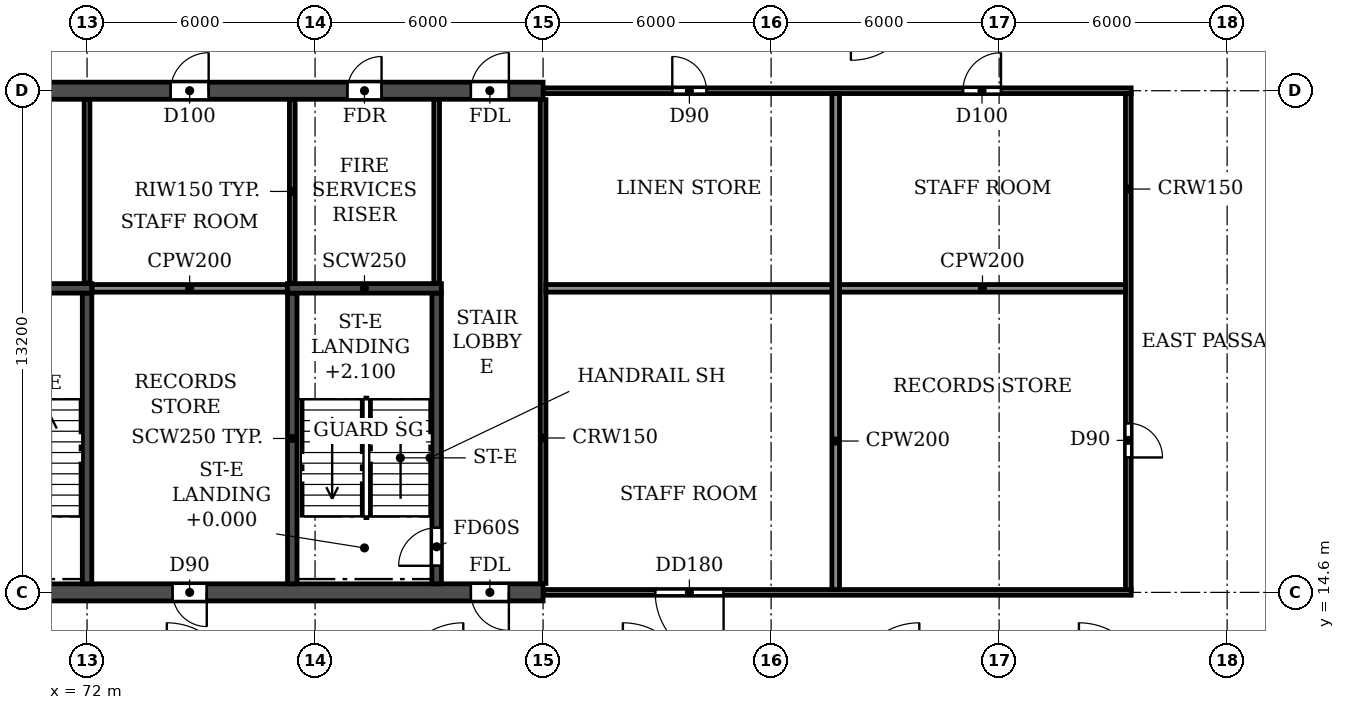
"""IFC4 building model, lengths in metres.
Left out: names, types, materials, properties, quantities, classifications, styles, units other than length and angle.
Written with IfcOpenShell. Run it as: python <this file> out.ifc"""

import sys

from ifc_helpers import new_model, si_unit, direction, frame, frame_2d, origin, place, context, subcontext, project, spatial, rectangle, extrude, element, fill, save


model = new_model("IFC4")
c1 = context("Model", 3, precision=1e-05, world=origin(), true_north=direction((0.0, 1.0)))
c2 = subcontext(c1, "Body", "Model", "MODEL_VIEW")
j1 = project(units=[si_unit("LENGTHUNIT", "METRE"), si_unit("PLANEANGLEUNIT", "RADIAN")], contexts=[c1])
p1 = place(None, origin())
s1 = spatial("IfcSite", under=j1, at=p1, CompositionType="ELEMENT")
p2 = place(p1, origin())
s2 = spatial("IfcBuilding", under=s1, at=p2, CompositionType="ELEMENT")
p3 = place(p2, frame((0.0, 0.0, 10.8)))
s3 = spatial("IfcBuildingStorey", under=s2, at=p3, CompositionType="ELEMENT", Elevation=10.8)
p4 = place(p3, frame((18.0, 14.6, 0.0), z_axis=(0.0, 0.0, 1.0), x_axis=(1.0, 0.0, 0.0)))
e1 = element("IfcWall", 1, at=p4, inside=s3, PredefinedType="SOLIDWALL", context=c2, shape_type="SweptSolid", body=[
    extrude(rectangle(XDim=66.0, YDim=0.45, at=frame_2d((33.0, 0.0))), origin(), (0.0, 0.0, 1.0), 3.92),
])
p5 = place(p4, frame((0.9, 0.0, 0.0)))
e2 = element("IfcOpeningElement", 2, at=p5, cuts=e1, PredefinedType="OPENING", context=c2, shape_type="SweptSolid", body=[
    extrude(rectangle(XDim=1.0, YDim=2.1, at=frame_2d((0.5, 1.05))), frame((0.0, 0.235, 0.0), z_axis=(0.0, -1.0, 0.0), x_axis=(1.0, 0.0, 0.0)), (0.0, 0.0, 1.0), 0.47),
])
p6 = place(p4, frame((8.8, 0.0, 0.0)))
e3 = element("IfcOpeningElement", 3, at=p6, cuts=e1, PredefinedType="OPENING", context=c2, shape_type="SweptSolid", body=[
    extrude(rectangle(XDim=1.0, YDim=2.1, at=frame_2d((0.5, 1.05))), frame((0.0, 0.235, 0.0), z_axis=(0.0, -1.0, 0.0), x_axis=(1.0, 0.0, 0.0)), (0.0, 0.0, 1.0), 0.47),
])
p7 = place(p4, frame((13.4, 0.0, 0.0)))
e4 = element("IfcOpeningElement", 4, at=p7, cuts=e1, PredefinedType="OPENING", context=c2, shape_type="SweptSolid", body=[
    extrude(rectangle(XDim=1.0, YDim=2.1, at=frame_2d((0.5, 1.05))), frame((0.0, 0.235, 0.0), z_axis=(0.0, -1.0, 0.0), x_axis=(1.0, 0.0, 0.0)), (0.0, 0.0, 1.0), 0.47),
])
p8 = place(p4, frame((24.7, 0.0, 0.0)))
e5 = element("IfcOpeningElement", 5, at=p8, cuts=e1, PredefinedType="OPENING", context=c2, shape_type="SweptSolid", body=[
    extrude(rectangle(XDim=1.0, YDim=2.1, at=frame_2d((0.5, 1.05))), frame((0.0, 0.235, 0.0), z_axis=(0.0, -1.0, 0.0), x_axis=(1.0, 0.0, 0.0)), (0.0, 0.0, 1.0), 0.47),
])
p9 = place(p4, frame((28.6, 0.0, 0.0)))
e6 = element("IfcOpeningElement", 6, at=p9, cuts=e1, PredefinedType="OPENING", context=c2, shape_type="SweptSolid", body=[
    extrude(rectangle(XDim=1.0, YDim=2.1, at=frame_2d((0.5, 1.05))), frame((0.0, 0.235, 0.0), z_axis=(0.0, -1.0, 0.0), x_axis=(1.0, 0.0, 0.0)), (0.0, 0.0, 1.0), 0.47),
])
p10 = place(p4, frame((32.5, 0.0, 0.0)))
e7 = element("IfcOpeningElement", 7, at=p10, cuts=e1, PredefinedType="OPENING", context=c2, shape_type="SweptSolid", body=[
    extrude(rectangle(XDim=1.0, YDim=2.1, at=frame_2d((0.5, 1.05))), frame((0.0, 0.235, 0.0), z_axis=(0.0, -1.0, 0.0), x_axis=(1.0, 0.0, 0.0)), (0.0, 0.0, 1.0), 0.47),
])
p11 = place(p4, frame((35.1, 0.0, 0.0)))
e8 = element("IfcOpeningElement", 8, at=p11, cuts=e1, PredefinedType="OPENING", context=c2, shape_type="SweptSolid", body=[
    extrude(rectangle(XDim=1.0, YDim=2.1, at=frame_2d((0.5, 1.05))), frame((0.0, 0.235, 0.0), z_axis=(0.0, -1.0, 0.0), x_axis=(1.0, 0.0, 0.0)), (0.0, 0.0, 1.0), 0.47),
])
p12 = place(p4, frame((39.0, 0.0, 0.0)))
e9 = element("IfcOpeningElement", 9, at=p12, cuts=e1, PredefinedType="OPENING", context=c2, shape_type="SweptSolid", body=[
    extrude(rectangle(XDim=1.0, YDim=2.1, at=frame_2d((0.5, 1.05))), frame((0.0, 0.235, 0.0), z_axis=(0.0, -1.0, 0.0), x_axis=(1.0, 0.0, 0.0)), (0.0, 0.0, 1.0), 0.47),
])
p13 = place(p4, frame((51.6, 0.0, 0.0)))
e10 = element("IfcOpeningElement", 10, at=p13, cuts=e1, PredefinedType="OPENING", context=c2, shape_type="SweptSolid", body=[
    extrude(rectangle(XDim=1.0, YDim=2.1, at=frame_2d((0.5, 1.05))), frame((0.0, 0.235, 0.0), z_axis=(0.0, -1.0, 0.0), x_axis=(1.0, 0.0, 0.0)), (0.0, 0.0, 1.0), 0.47),
])
p14 = place(p4, frame((56.25, 0.0, 0.0)))
e11 = element("IfcOpeningElement", 11, at=p14, cuts=e1, PredefinedType="OPENING", context=c2, shape_type="SweptSolid", body=[
    extrude(rectangle(XDim=0.9, YDim=2.1, at=frame_2d((0.45, 1.05))), frame((0.0, 0.235, 0.0), z_axis=(0.0, -1.0, 0.0), x_axis=(1.0, 0.0, 0.0)), (0.0, 0.0, 1.0), 0.47),
])
p15 = place(p4, frame((64.1, 0.0, 0.0)))
e12 = element("IfcOpeningElement", 12, at=p15, cuts=e1, PredefinedType="OPENING", context=c2, shape_type="SweptSolid", body=[
    extrude(rectangle(XDim=1.0, YDim=2.1, at=frame_2d((0.5, 1.05))), frame((0.0, 0.235, 0.0), z_axis=(0.0, -1.0, 0.0), x_axis=(1.0, 0.0, 0.0)), (0.0, 0.0, 1.0), 0.47),
])
p16 = place(p3, frame((18.0, 27.8, 0.0), z_axis=(0.0, 0.0, 1.0), x_axis=(1.0, 0.0, 0.0)))
e13 = element("IfcWall", 13, at=p16, inside=s3, PredefinedType="SOLIDWALL", context=c2, shape_type="SweptSolid", body=[
    extrude(rectangle(XDim=66.0, YDim=0.45, at=frame_2d((33.0, 0.0))), origin(), (0.0, 0.0, 1.0), 3.92),
])
p17 = place(p16, frame((0.9, 0.0, 0.0)))
e14 = element("IfcOpeningElement", 14, at=p17, cuts=e13, PredefinedType="OPENING", context=c2, shape_type="SweptSolid", body=[
    extrude(rectangle(XDim=1.0, YDim=2.1, at=frame_2d((0.5, 1.05))), frame((0.0, 0.235, 0.0), z_axis=(0.0, -1.0, 0.0), x_axis=(1.0, 0.0, 0.0)), (0.0, 0.0, 1.0), 0.47),
])
p18 = place(p16, frame((4.25, 0.0, 0.0)))
e15 = element("IfcOpeningElement", 15, at=p18, cuts=e13, PredefinedType="OPENING", context=c2, shape_type="SweptSolid", body=[
    extrude(rectangle(XDim=0.9, YDim=2.1, at=frame_2d((0.45, 1.05))), frame((0.0, 0.235, 0.0), z_axis=(0.0, -1.0, 0.0), x_axis=(1.0, 0.0, 0.0)), (0.0, 0.0, 1.0), 0.47),
])
p19 = place(p16, frame((8.85, 0.0, 0.0)))
e16 = element("IfcOpeningElement", 16, at=p19, cuts=e13, PredefinedType="OPENING", context=c2, shape_type="SweptSolid", body=[
    extrude(rectangle(XDim=0.9, YDim=2.1, at=frame_2d((0.45, 1.05))), frame((0.0, 0.235, 0.0), z_axis=(0.0, -1.0, 0.0), x_axis=(1.0, 0.0, 0.0)), (0.0, 0.0, 1.0), 0.47),
])
p20 = place(p16, frame((13.45, 0.0, 0.0)))
e17 = element("IfcOpeningElement", 17, at=p20, cuts=e13, PredefinedType="OPENING", context=c2, shape_type="SweptSolid", body=[
    extrude(rectangle(XDim=0.9, YDim=2.1, at=frame_2d((0.45, 1.05))), frame((0.0, 0.235, 0.0), z_axis=(0.0, -1.0, 0.0), x_axis=(1.0, 0.0, 0.0)), (0.0, 0.0, 1.0), 0.47),
])
p21 = place(p16, frame((18.95, 0.0, 0.0)))
e18 = element("IfcOpeningElement", 18, at=p21, cuts=e13, PredefinedType="OPENING", context=c2, shape_type="SweptSolid", body=[
    extrude(rectangle(XDim=1.5, YDim=2.1, at=frame_2d((0.75, 1.05))), frame((0.0, 0.235, 0.0), z_axis=(0.0, -1.0, 0.0), x_axis=(1.0, 0.0, 0.0)), (0.0, 0.0, 1.0), 0.47),
])
p22 = place(p16, frame((24.4, 0.0, 0.0)))
e19 = element("IfcOpeningElement", 19, at=p22, cuts=e13, PredefinedType="OPENING", context=c2, shape_type="SweptSolid", body=[
    extrude(rectangle(XDim=1.0, YDim=2.1, at=frame_2d((0.5, 1.05))), frame((0.0, 0.235, 0.0), z_axis=(0.0, -1.0, 0.0), x_axis=(1.0, 0.0, 0.0)), (0.0, 0.0, 1.0), 0.47),
])
p23 = place(p16, frame((29.6, 0.0, 0.0)))
e20 = element("IfcOpeningElement", 20, at=p23, cuts=e13, PredefinedType="OPENING", context=c2, shape_type="SweptSolid", body=[
    extrude(rectangle(XDim=1.0, YDim=2.1, at=frame_2d((0.5, 1.05))), frame((0.0, 0.235, 0.0), z_axis=(0.0, -1.0, 0.0), x_axis=(1.0, 0.0, 0.0)), (0.0, 0.0, 1.0), 0.47),
])
p24 = place(p16, frame((32.5, 0.0, 0.0)))
e21 = element("IfcOpeningElement", 21, at=p24, cuts=e13, PredefinedType="OPENING", context=c2, shape_type="SweptSolid", body=[
    extrude(rectangle(XDim=1.0, YDim=2.1, at=frame_2d((0.5, 1.05))), frame((0.0, 0.235, 0.0), z_axis=(0.0, -1.0, 0.0), x_axis=(1.0, 0.0, 0.0)), (0.0, 0.0, 1.0), 0.47),
])
p25 = place(p16, frame((38.0, 0.0, 0.0)))
e22 = element("IfcOpeningElement", 22, at=p25, cuts=e13, PredefinedType="OPENING", context=c2, shape_type="SweptSolid", body=[
    extrude(rectangle(XDim=1.0, YDim=2.1, at=frame_2d((0.5, 1.05))), frame((0.0, 0.235, 0.0), z_axis=(0.0, -1.0, 0.0), x_axis=(1.0, 0.0, 0.0)), (0.0, 0.0, 1.0), 0.47),
])
p26 = place(p16, frame((43.2, 0.0, 0.0)))
e23 = element("IfcOpeningElement", 23, at=p26, cuts=e13, PredefinedType="OPENING", context=c2, shape_type="SweptSolid", body=[
    extrude(rectangle(XDim=1.0, YDim=2.1, at=frame_2d((0.5, 1.05))), frame((0.0, 0.235, 0.0), z_axis=(0.0, -1.0, 0.0), x_axis=(1.0, 0.0, 0.0)), (0.0, 0.0, 1.0), 0.47),
])
p27 = place(p16, frame((47.1, 0.0, 0.0)))
e24 = element("IfcOpeningElement", 24, at=p27, cuts=e13, PredefinedType="OPENING", context=c2, shape_type="SweptSolid", body=[
    extrude(rectangle(XDim=1.0, YDim=2.1, at=frame_2d((0.5, 1.05))), frame((0.0, 0.235, 0.0), z_axis=(0.0, -1.0, 0.0), x_axis=(1.0, 0.0, 0.0)), (0.0, 0.0, 1.0), 0.47),
])
p28 = place(p16, frame((51.65, 0.0, 0.0)))
e25 = element("IfcOpeningElement", 25, at=p28, cuts=e13, PredefinedType="OPENING", context=c2, shape_type="SweptSolid", body=[
    extrude(rectangle(XDim=0.9, YDim=2.1, at=frame_2d((0.45, 1.05))), frame((0.0, 0.235, 0.0), z_axis=(0.0, -1.0, 0.0), x_axis=(1.0, 0.0, 0.0)), (0.0, 0.0, 1.0), 0.47),
])
p29 = place(p16, frame((56.2, 0.0, 0.0)))
e26 = element("IfcOpeningElement", 26, at=p29, cuts=e13, PredefinedType="OPENING", context=c2, shape_type="SweptSolid", body=[
    extrude(rectangle(XDim=1.0, YDim=2.1, at=frame_2d((0.5, 1.05))), frame((0.0, 0.235, 0.0), z_axis=(0.0, -1.0, 0.0), x_axis=(1.0, 0.0, 0.0)), (0.0, 0.0, 1.0), 0.47),
])
p30 = place(p16, frame((60.85, 0.0, 0.0)))
e27 = element("IfcOpeningElement", 27, at=p30, cuts=e13, PredefinedType="OPENING", context=c2, shape_type="SweptSolid", body=[
    extrude(rectangle(XDim=0.9, YDim=2.1, at=frame_2d((0.45, 1.05))), frame((0.0, 0.235, 0.0), z_axis=(0.0, -1.0, 0.0), x_axis=(1.0, 0.0, 0.0)), (0.0, 0.0, 1.0), 0.47),
])
p31 = place(p16, frame((64.1, 0.0, 0.0)))
e28 = element("IfcOpeningElement", 28, at=p31, cuts=e13, PredefinedType="OPENING", context=c2, shape_type="SweptSolid", body=[
    extrude(rectangle(XDim=1.0, YDim=2.1, at=frame_2d((0.5, 1.05))), frame((0.0, 0.235, 0.0), z_axis=(0.0, -1.0, 0.0), x_axis=(1.0, 0.0, 0.0)), (0.0, 0.0, 1.0), 0.47),
])
p32 = place(p3, frame((72.0, 14.825, 0.0), z_axis=(0.0, 0.0, 1.0), x_axis=(0.0, 1.0, 0.0)))
e29 = element("IfcWall", 29, at=p32, inside=s3, PredefinedType="SOLIDWALL", context=c2, shape_type="SweptSolid", body=[
    extrude(rectangle(XDim=7.65, YDim=0.25, at=frame_2d((3.825, 0.0))), origin(), (0.0, 0.0, 1.0), 3.92),
])
p33 = place(p3, frame((68.075, 22.6, 0.0), z_axis=(0.0, 0.0, 1.0), x_axis=(1.0, 0.0, 0.0)))
e30 = element("IfcWall", 30, at=p33, inside=s3, PredefinedType="SOLIDWALL", context=c2, shape_type="SweptSolid", body=[
    extrude(rectangle(XDim=4.05, YDim=0.25, at=frame_2d((2.025, 0.0))), origin(), (0.0, 0.0, 1.0), 3.92),
])
p34 = place(p3, frame((77.4, 14.825, 0.0), z_axis=(0.0, 0.0, 1.0), x_axis=(0.0, 1.0, 0.0)))
e31 = element("IfcWall", 31, at=p34, inside=s3, PredefinedType="SOLIDWALL", context=c2, shape_type="SweptSolid", body=[
    extrude(rectangle(XDim=7.65, YDim=0.25, at=frame_2d((3.825, 0.0))), origin(), (0.0, 0.0, 1.0), 3.92),
])
p35 = place(p3, frame((81.2, 14.825, 0.0), z_axis=(0.0, 0.0, 1.0), x_axis=(0.0, 1.0, 0.0)))
e32 = element("IfcWall", 32, at=p35, inside=s3, PredefinedType="SOLIDWALL", context=c2, shape_type="SweptSolid", body=[
    extrude(rectangle(XDim=7.65, YDim=0.25, at=frame_2d((3.825, 0.0))), origin(), (0.0, 0.0, 1.0), 3.92),
])
p36 = place(p35, frame((0.475, 0.0, 0.0)))
e33 = element("IfcOpeningElement", 33, at=p36, cuts=e32, PredefinedType="OPENING", context=c2, shape_type="SweptSolid", body=[
    extrude(rectangle(XDim=1.0, YDim=2.1, at=frame_2d((0.5, 1.05))), frame((0.0, 0.135, 0.0), z_axis=(0.0, -1.0, 0.0), x_axis=(1.0, 0.0, 0.0)), (0.0, 0.0, 1.0), 0.27),
])
p37 = place(p3, frame((77.275, 22.6, 0.0), z_axis=(0.0, 0.0, 1.0), x_axis=(1.0, 0.0, 0.0)))
e34 = element("IfcWall", 34, at=p37, inside=s3, PredefinedType="SOLIDWALL", context=c2, shape_type="SweptSolid", body=[
    extrude(rectangle(XDim=4.05, YDim=0.25, at=frame_2d((2.025, 0.0))), origin(), (0.0, 0.0, 1.0), 3.92),
])
p38 = place(p3, frame((84.01, 14.6, 0.0), z_axis=(0.0, 0.0, 1.0), x_axis=(1.0, 0.0, 0.0)))
e35 = element("IfcWall", 35, at=p38, inside=s3, PredefinedType="PARTITIONING", context=c2, shape_type="SweptSolid", body=[
    extrude(rectangle(XDim=15.465, YDim=0.15, at=frame_2d((7.732, 0.0))), origin(), (0.0, 0.0, 1.0), 3.92),
])
p39 = place(p38, frame((2.94, 0.0, 0.0)))
e36 = element("IfcOpeningElement", 36, at=p39, cuts=e35, PredefinedType="OPENING", context=c2, shape_type="SweptSolid", body=[
    extrude(rectangle(XDim=1.8, YDim=2.1, at=frame_2d((0.9, 1.05))), frame((0.0, 0.085, 0.0), z_axis=(0.0, -1.0, 0.0), x_axis=(1.0, 0.0, 0.0)), (0.0, 0.0, 1.0), 0.17),
])
p40 = place(p3, frame((84.01, 27.8, 0.0), z_axis=(0.0, 0.0, 1.0), x_axis=(1.0, 0.0, 0.0)))
e37 = element("IfcWall", 37, at=p40, inside=s3, PredefinedType="PARTITIONING", context=c2, shape_type="SweptSolid", body=[
    extrude(rectangle(XDim=15.465, YDim=0.15, at=frame_2d((7.732, 0.0))), origin(), (0.0, 0.0, 1.0), 3.92),
])
p41 = place(p40, frame((3.39, 0.0, 0.0)))
e38 = element("IfcOpeningElement", 38, at=p41, cuts=e37, PredefinedType="OPENING", context=c2, shape_type="SweptSolid", body=[
    extrude(rectangle(XDim=0.9, YDim=2.1, at=frame_2d((0.45, 1.05))), frame((0.0, 0.085, 0.0), z_axis=(0.0, -1.0, 0.0), x_axis=(1.0, 0.0, 0.0)), (0.0, 0.0, 1.0), 0.17),
])
p42 = place(p40, frame((11.04, 0.0, 0.0)))
e39 = element("IfcOpeningElement", 39, at=p42, cuts=e37, PredefinedType="OPENING", context=c2, shape_type="SweptSolid", body=[
    extrude(rectangle(XDim=1.0, YDim=2.1, at=frame_2d((0.5, 1.05))), frame((0.0, 0.085, 0.0), z_axis=(0.0, -1.0, 0.0), x_axis=(1.0, 0.0, 0.0)), (0.0, 0.0, 1.0), 0.17),
])
p43 = place(p3, frame((84.0, 14.835, 0.0), z_axis=(0.0, 0.0, 1.0), x_axis=(0.0, 1.0, 0.0)))
e40 = element("IfcWall", 40, at=p43, inside=s3, PredefinedType="PARTITIONING", context=c2, shape_type="SweptSolid", body=[
    extrude(rectangle(XDim=12.73, YDim=0.15, at=frame_2d((6.365, 0.0))), origin(), (0.0, 0.0, 1.0), 3.92),
])
p44 = place(p3, frame((99.4, 14.675, 0.0), z_axis=(0.0, 0.0, 1.0), x_axis=(0.0, 1.0, 0.0)))
e41 = element("IfcWall", 41, at=p44, inside=s3, PredefinedType="PARTITIONING", context=c2, shape_type="SweptSolid", body=[
    extrude(rectangle(XDim=13.05, YDim=0.15, at=frame_2d((6.525, 0.0))), origin(), (0.0, 0.0, 1.0), 3.92),
])
p45 = place(p44, frame((3.475, 0.0, 0.0)))
e42 = element("IfcOpeningElement", 42, at=p45, cuts=e41, PredefinedType="OPENING", context=c2, shape_type="SweptSolid", body=[
    extrude(rectangle(XDim=0.9, YDim=2.1, at=frame_2d((0.45, 1.05))), frame((0.0, 0.085, 0.0), z_axis=(0.0, -1.0, 0.0), x_axis=(1.0, 0.0, 0.0)), (0.0, 0.0, 1.0), 0.17),
])
p46 = place(p3, frame((72.135, 22.6, 0.0), z_axis=(0.0, 0.0, 1.0), x_axis=(1.0, 0.0, 0.0)))
e43 = element("IfcWall", 43, at=p46, inside=s3, PredefinedType="PARTITIONING", context=c2, shape_type="SweptSolid", body=[
    extrude(rectangle(XDim=5.13, YDim=0.2, at=frame_2d((2.565, 0.0))), origin(), (0.0, 0.0, 1.0), 3.92),
])
p47 = place(p3, frame((84.075, 22.6, 0.0), z_axis=(0.0, 0.0, 1.0), x_axis=(1.0, 0.0, 0.0)))
e44 = element("IfcWall", 44, at=p47, inside=s3, PredefinedType="PARTITIONING", context=c2, shape_type="SweptSolid", body=[
    extrude(rectangle(XDim=15.25, YDim=0.2, at=frame_2d((7.625, 0.0))), origin(), (0.0, 0.0, 1.0), 3.92),
])
p48 = place(p3, frame((91.7, 14.675, 0.0), z_axis=(0.0, 0.0, 1.0), x_axis=(0.0, 1.0, 0.0)))
e45 = element("IfcWall", 45, at=p48, inside=s3, PredefinedType="PARTITIONING", context=c2, shape_type="SweptSolid", body=[
    extrude(rectangle(XDim=13.05, YDim=0.2, at=frame_2d((6.525, 0.0))), origin(), (0.0, 0.0, 1.0), 3.92),
])
for number, where, z_axis, x_axis in (
    (46, (72.0, 22.735, 0.0), (0.0, 0.0, 1.0), (0.0, 1.0, 0.0)),
    (47, (77.4, 22.735, 0.0), (0.0, 0.0, 1.0), (0.0, 1.0, 0.0)),
    (48, (81.2, 22.735, 0.0), (0.0, 0.0, 1.0), (0.0, 1.0, 0.0)),
):
    element("IfcWall", number, at=place(p3, frame(where, z_axis=z_axis, x_axis=x_axis)), inside=s3, PredefinedType="PARTITIONING", context=c2, shape_type="SweptSolid", body=[
        extrude(rectangle(XDim=4.83, YDim=0.15, at=frame_2d((2.415, 0.0))), origin(), (0.0, 0.0, 1.0), 3.92),
    ])
p49 = place(p45, frame((0.9, 0.0, 0.0), z_axis=(0.0, 0.0, 1.0), x_axis=(-1.0, 0.0, 0.0)))
e49 = element("IfcDoor", 49, at=p49, inside=s3, OperationType="SINGLE_SWING_RIGHT", PredefinedType="DOOR", context=c2, shape_type="SweptSolid", body=[
    extrude(rectangle(XDim=0.9, YDim=2.1, at=frame_2d((0.45, 1.05))), frame((0.0, 0.025, 0.0), z_axis=(0.0, -1.0, 0.0), x_axis=(1.0, 0.0, 0.0)), (0.0, 0.0, 1.0), 0.05),
])
fill(e42, e49)
p50 = place(p29, origin())
e50 = element("IfcDoor", 50, at=p50, inside=s3, OperationType="SINGLE_SWING_RIGHT", PredefinedType="DOOR", context=c2, shape_type="SweptSolid", body=[
    extrude(rectangle(XDim=1.0, YDim=2.1, at=frame_2d((0.5, 1.05))), frame((0.0, 0.025, 0.0), z_axis=(0.0, -1.0, 0.0), x_axis=(1.0, 0.0, 0.0)), (0.0, 0.0, 1.0), 0.05),
])
fill(e26, e50)
p51 = place(p30, origin())
e51 = element("IfcDoor", 51, at=p51, inside=s3, OperationType="SINGLE_SWING_RIGHT", PredefinedType="DOOR", context=c2, shape_type="SweptSolid", body=[
    extrude(rectangle(XDim=0.9, YDim=2.1, at=frame_2d((0.45, 1.05))), frame((0.0, 0.025, 0.0), z_axis=(0.0, -1.0, 0.0), x_axis=(1.0, 0.0, 0.0)), (0.0, 0.0, 1.0), 0.05),
])
fill(e27, e51)
p52 = place(p31, origin())
e52 = element("IfcDoor", 52, at=p52, inside=s3, OperationType="SINGLE_SWING_RIGHT", PredefinedType="DOOR", context=c2, shape_type="SweptSolid", body=[
    extrude(rectangle(XDim=1.0, YDim=2.1, at=frame_2d((0.5, 1.05))), frame((0.0, 0.025, 0.0), z_axis=(0.0, -1.0, 0.0), x_axis=(1.0, 0.0, 0.0)), (0.0, 0.0, 1.0), 0.05),
])
fill(e28, e52)
p53 = place(p41, origin())
e53 = element("IfcDoor", 53, at=p53, inside=s3, OperationType="SINGLE_SWING_LEFT", PredefinedType="DOOR", context=c2, shape_type="SweptSolid", body=[
    extrude(rectangle(XDim=0.9, YDim=2.1, at=frame_2d((0.45, 1.05))), frame((0.0, 0.025, 0.0), z_axis=(0.0, -1.0, 0.0), x_axis=(1.0, 0.0, 0.0)), (0.0, 0.0, 1.0), 0.05),
])
fill(e38, e53)
p54 = place(p42, origin())
e54 = element("IfcDoor", 54, at=p54, inside=s3, OperationType="SINGLE_SWING_RIGHT", PredefinedType="DOOR", context=c2, shape_type="SweptSolid", body=[
    extrude(rectangle(XDim=1.0, YDim=2.1, at=frame_2d((0.5, 1.05))), frame((0.0, 0.025, 0.0), z_axis=(0.0, -1.0, 0.0), x_axis=(1.0, 0.0, 0.0)), (0.0, 0.0, 1.0), 0.05),
])
fill(e39, e54)
p55 = place(p14, frame((0.9, 0.0, 0.0), z_axis=(0.0, 0.0, 1.0), x_axis=(-1.0, 0.0, 0.0)))
e55 = element("IfcDoor", 55, at=p55, inside=s3, OperationType="SINGLE_SWING_LEFT", PredefinedType="DOOR", context=c2, shape_type="SweptSolid", body=[
    extrude(rectangle(XDim=0.9, YDim=2.1, at=frame_2d((0.45, 1.05))), frame((0.0, 0.025, 0.0), z_axis=(0.0, -1.0, 0.0), x_axis=(1.0, 0.0, 0.0)), (0.0, 0.0, 1.0), 0.05),
])
fill(e11, e55)
p56 = place(p15, frame((1.0, 0.0, 0.0), z_axis=(0.0, 0.0, 1.0), x_axis=(-1.0, 0.0, 0.0)))
e56 = element("IfcDoor", 56, at=p56, inside=s3, OperationType="SINGLE_SWING_LEFT", PredefinedType="DOOR", context=c2, shape_type="SweptSolid", body=[
    extrude(rectangle(XDim=1.0, YDim=2.1, at=frame_2d((0.5, 1.05))), frame((0.0, 0.025, 0.0), z_axis=(0.0, -1.0, 0.0), x_axis=(1.0, 0.0, 0.0)), (0.0, 0.0, 1.0), 0.05),
])
fill(e12, e56)
p57 = place(p39, frame((1.8, 0.0, 0.0), z_axis=(0.0, 0.0, 1.0), x_axis=(-1.0, 0.0, 0.0)))
e57 = element("IfcDoor", 57, at=p57, inside=s3, OperationType="DOUBLE_DOOR_SINGLE_SWING", PredefinedType="DOOR", context=c2, shape_type="SweptSolid", body=[
    extrude(rectangle(XDim=1.8, YDim=2.1, at=frame_2d((0.9, 1.05))), frame((0.0, 0.025, 0.0), z_axis=(0.0, -1.0, 0.0), x_axis=(1.0, 0.0, 0.0)), (0.0, 0.0, 1.0), 0.05),
])
fill(e36, e57)
p58 = place(p36, origin())
e58 = element("IfcDoor", 58, at=p58, inside=s3, OperationType="SINGLE_SWING_LEFT", PredefinedType="DOOR", context=c2, shape_type="SweptSolid", body=[
    extrude(rectangle(XDim=1.0, YDim=2.1, at=frame_2d((0.5, 1.05))), frame((0.0, 0.025, 0.0), z_axis=(0.0, -1.0, 0.0), x_axis=(1.0, 0.0, 0.0)), (0.0, 0.0, 1.0), 0.05),
])
fill(e33, e58)
save(model, sys.argv[1])
